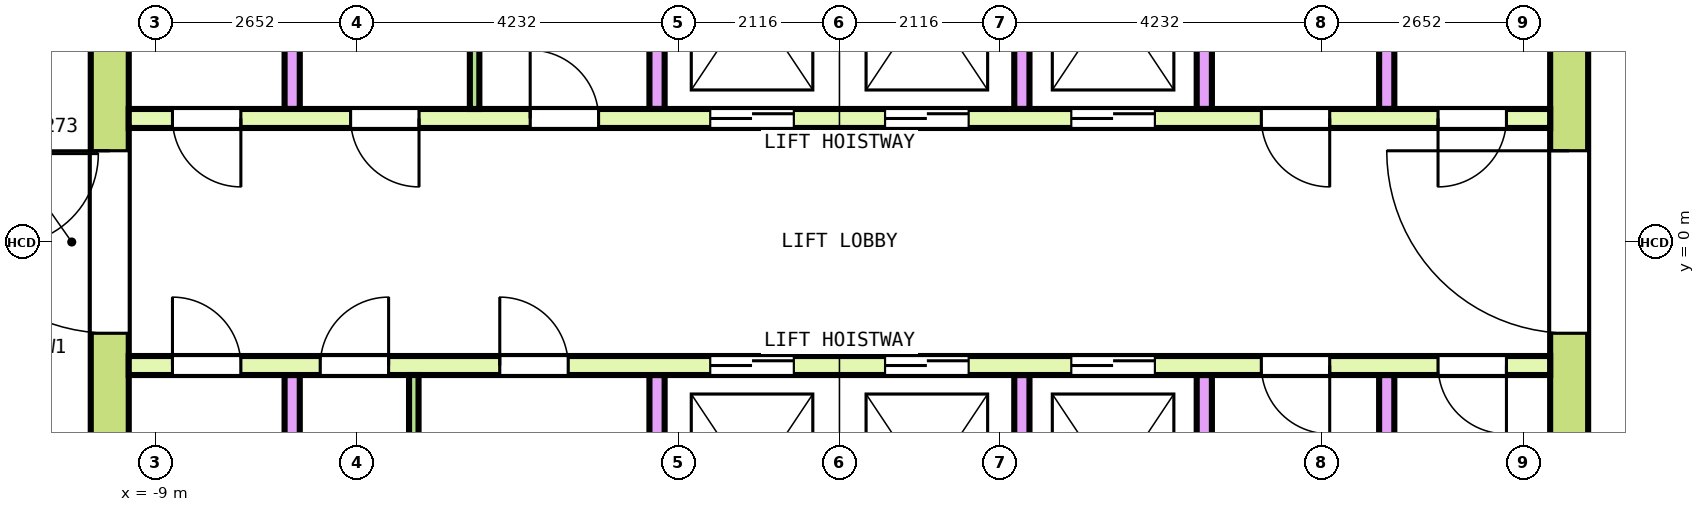
"""IFC4 building model, lengths in metres.
Left out: names, types, materials, properties, quantities, classifications, styles, units other than length and angle.
Written with IfcOpenShell. Run it as: python <this file> out.ifc"""

import sys

from ifc_helpers import new_model, si_unit, direction, frame, frame_2d, origin, place, context, subcontext, project, spatial, rectangle, extrude, element, fill, save


model = new_model("IFC4")
c1 = context("Model", 3, precision=1e-05, world=origin(), true_north=direction((0.0, 1.0)))
c2 = subcontext(c1, "Body", "Model", "MODEL_VIEW")
j1 = project(units=[si_unit("LENGTHUNIT", "METRE"), si_unit("PLANEANGLEUNIT", "RADIAN")], contexts=[c1])
p1 = place(None, origin())
s1 = spatial("IfcSite", under=j1, at=p1, CompositionType="ELEMENT")
p2 = place(p1, origin())
s2 = spatial("IfcBuilding", under=s1, at=p2, CompositionType="ELEMENT")
p3 = place(p2, frame((0.0, 0.0, 299.0)))
s3 = spatial("IfcBuildingStorey", under=s2, at=p3, CompositionType="ELEMENT", Elevation=299.0)
p4 = place(p3, frame((-9.6, -7.85, 0.0), z_axis=(0.0, 0.0, 1.0), x_axis=(0.0, 1.0, 0.0)))
e1 = element("IfcWall", 1, at=p4, inside=s3, PredefinedType="SHEAR", context=c2, shape_type="SweptSolid", body=[
    extrude(rectangle(XDim=15.7, YDim=0.5, at=frame_2d((7.85, 0.0))), origin(), (0.0, 0.0, 1.0), 3.7),
])
p5 = place(p4, frame((6.65, 0.0, 0.0)))
e2 = element("IfcOpeningElement", 2, at=p5, cuts=e1, PredefinedType="OPENING", context=c2, shape_type="SweptSolid", body=[
    extrude(rectangle(XDim=2.4, YDim=2.1, at=frame_2d((1.2, 1.05))), frame((0.0, 0.26, 0.0), z_axis=(0.0, -1.0, 0.0), x_axis=(1.0, 0.0, 0.0)), (0.0, 0.0, 1.0), 0.52),
])
p6 = place(p4, frame((13.55, 0.0, 0.0)))
e3 = element("IfcOpeningElement", 3, at=p6, cuts=e1, PredefinedType="OPENING", context=c2, shape_type="SweptSolid", body=[
    extrude(rectangle(XDim=1.2, YDim=2.1, at=frame_2d((0.6, 1.05))), frame((0.0, 0.26, 0.0), z_axis=(0.0, -1.0, 0.0), x_axis=(1.0, 0.0, 0.0)), (0.0, 0.0, 1.0), 0.52),
])
p7 = place(p4, frame((0.95, 0.0, 0.0)))
e4 = element("IfcOpeningElement", 4, at=p7, cuts=e1, PredefinedType="OPENING", context=c2, shape_type="SweptSolid", body=[
    extrude(rectangle(XDim=1.2, YDim=2.1, at=frame_2d((0.6, 1.05))), frame((0.0, 0.26, 0.0), z_axis=(0.0, -1.0, 0.0), x_axis=(1.0, 0.0, 0.0)), (0.0, 0.0, 1.0), 0.52),
])
p8 = place(p3, frame((9.6, -7.85, 0.0), z_axis=(0.0, 0.0, 1.0), x_axis=(0.0, 1.0, 0.0)))
e5 = element("IfcWall", 5, at=p8, inside=s3, PredefinedType="SHEAR", context=c2, shape_type="SweptSolid", body=[
    extrude(rectangle(XDim=15.7, YDim=0.5, at=frame_2d((7.85, 0.0))), origin(), (0.0, 0.0, 1.0), 3.7),
])
p9 = place(p8, frame((6.65, 0.0, 0.0)))
e6 = element("IfcOpeningElement", 6, at=p9, cuts=e5, PredefinedType="OPENING", context=c2, shape_type="SweptSolid", body=[
    extrude(rectangle(XDim=2.4, YDim=2.1, at=frame_2d((1.2, 1.05))), frame((0.0, 0.26, 0.0), z_axis=(0.0, -1.0, 0.0), x_axis=(1.0, 0.0, 0.0)), (0.0, 0.0, 1.0), 0.52),
])
p10 = place(p8, frame((13.55, 0.0, 0.0)))
e7 = element("IfcOpeningElement", 7, at=p10, cuts=e5, PredefinedType="OPENING", context=c2, shape_type="SweptSolid", body=[
    extrude(rectangle(XDim=1.2, YDim=2.1, at=frame_2d((0.6, 1.05))), frame((0.0, 0.26, 0.0), z_axis=(0.0, -1.0, 0.0), x_axis=(1.0, 0.0, 0.0)), (0.0, 0.0, 1.0), 0.52),
])
p11 = place(p8, frame((1.05, 0.0, 0.0)))
e8 = element("IfcOpeningElement", 8, at=p11, cuts=e5, PredefinedType="OPENING", context=c2, shape_type="SweptSolid", body=[
    extrude(rectangle(XDim=1.0, YDim=2.1, at=frame_2d((0.5, 1.05))), frame((0.0, 0.26, 0.0), z_axis=(0.0, -1.0, 0.0), x_axis=(1.0, 0.0, 0.0)), (0.0, 0.0, 1.0), 0.52),
])
p12 = place(p3, frame((-9.35, 1.625, 0.0), z_axis=(0.0, 0.0, 1.0), x_axis=(1.0, 0.0, 0.0)))
e9 = element("IfcWall", 9, at=p12, inside=s3, PredefinedType="SOLIDWALL", context=c2, shape_type="SweptSolid", body=[
    extrude(rectangle(XDim=18.7, YDim=0.25, at=frame_2d((9.35, 0.0))), origin(), (0.0, 0.0, 1.0), 3.7),
])
p13 = place(p12, frame((7.65, 0.0, 0.0)))
e10 = element("IfcOpeningElement", 10, at=p13, cuts=e9, PredefinedType="OPENING", context=c2, shape_type="SweptSolid", body=[
    extrude(rectangle(XDim=1.1, YDim=2.1, at=frame_2d((0.55, 1.05))), frame((0.0, 0.135, 0.0), z_axis=(0.0, -1.0, 0.0), x_axis=(1.0, 0.0, 0.0)), (0.0, 0.0, 1.0), 0.27),
])
p14 = place(p12, frame((9.95, 0.0, 0.0)))
e11 = element("IfcOpeningElement", 11, at=p14, cuts=e9, PredefinedType="OPENING", context=c2, shape_type="SweptSolid", body=[
    extrude(rectangle(XDim=1.1, YDim=2.1, at=frame_2d((0.55, 1.05))), frame((0.0, 0.135, 0.0), z_axis=(0.0, -1.0, 0.0), x_axis=(1.0, 0.0, 0.0)), (0.0, 0.0, 1.0), 0.27),
])
p15 = place(p12, frame((12.4, 0.0, 0.0)))
e12 = element("IfcOpeningElement", 12, at=p15, cuts=e9, PredefinedType="OPENING", context=c2, shape_type="SweptSolid", body=[
    extrude(rectangle(XDim=1.1, YDim=2.1, at=frame_2d((0.55, 1.05))), frame((0.0, 0.135, 0.0), z_axis=(0.0, -1.0, 0.0), x_axis=(1.0, 0.0, 0.0)), (0.0, 0.0, 1.0), 0.27),
])
p16 = place(p12, frame((0.575, 0.0, 0.0)))
e13 = element("IfcOpeningElement", 13, at=p16, cuts=e9, PredefinedType="OPENING", context=c2, shape_type="SweptSolid", body=[
    extrude(rectangle(XDim=0.9, YDim=2.1, at=frame_2d((0.45, 1.05))), frame((0.0, 0.135, 0.0), z_axis=(0.0, -1.0, 0.0), x_axis=(1.0, 0.0, 0.0)), (0.0, 0.0, 1.0), 0.27),
])
p17 = place(p12, frame((2.919, 0.0, 0.0)))
e14 = element("IfcOpeningElement", 14, at=p17, cuts=e9, PredefinedType="OPENING", context=c2, shape_type="SweptSolid", body=[
    extrude(rectangle(XDim=0.9, YDim=2.1, at=frame_2d((0.45, 1.05))), frame((0.0, 0.135, 0.0), z_axis=(0.0, -1.0, 0.0), x_axis=(1.0, 0.0, 0.0)), (0.0, 0.0, 1.0), 0.27),
])
p18 = place(p12, frame((5.281, 0.0, 0.0)))
e15 = element("IfcOpeningElement", 15, at=p18, cuts=e9, PredefinedType="OPENING", context=c2, shape_type="SweptSolid", body=[
    extrude(rectangle(XDim=0.9, YDim=2.1, at=frame_2d((0.45, 1.05))), frame((0.0, 0.135, 0.0), z_axis=(0.0, -1.0, 0.0), x_axis=(1.0, 0.0, 0.0)), (0.0, 0.0, 1.0), 0.27),
])
p19 = place(p12, frame((14.9, 0.0, 0.0)))
e16 = element("IfcOpeningElement", 16, at=p19, cuts=e9, PredefinedType="OPENING", context=c2, shape_type="SweptSolid", body=[
    extrude(rectangle(XDim=0.9, YDim=2.1, at=frame_2d((0.45, 1.05))), frame((0.0, 0.135, 0.0), z_axis=(0.0, -1.0, 0.0), x_axis=(1.0, 0.0, 0.0)), (0.0, 0.0, 1.0), 0.27),
])
p20 = place(p12, frame((17.225, 0.0, 0.0)))
e17 = element("IfcOpeningElement", 17, at=p20, cuts=e9, PredefinedType="OPENING", context=c2, shape_type="SweptSolid", body=[
    extrude(rectangle(XDim=0.9, YDim=2.1, at=frame_2d((0.45, 1.05))), frame((0.0, 0.135, 0.0), z_axis=(0.0, -1.0, 0.0), x_axis=(1.0, 0.0, 0.0)), (0.0, 0.0, 1.0), 0.27),
])
for number, where, z_axis, x_axis in (
    (18, (-7.2, 1.75, 0.0), (0.0, 0.0, 1.0), (0.0, 1.0, 0.0)),
    (19, (-2.4, 1.75, 0.0), (0.0, 0.0, 1.0), (0.0, 1.0, 0.0)),
    (20, (2.4, 1.75, 0.0), (0.0, 0.0, 1.0), (0.0, 1.0, 0.0)),
    (21, (4.8, 1.75, 0.0), (0.0, 0.0, 1.0), (0.0, 1.0, 0.0)),
    (22, (7.2, 1.75, 0.0), (0.0, 0.0, 1.0), (0.0, 1.0, 0.0)),
):
    element("IfcWall", number, at=place(p3, frame(where, z_axis=z_axis, x_axis=x_axis)), inside=s3, PredefinedType="SOLIDWALL", context=c2, shape_type="SweptSolid", body=[
        extrude(rectangle(XDim=2.9, YDim=0.2, at=frame_2d((1.45, 0.0))), origin(), (0.0, 0.0, 1.0), 3.7),
    ])
p21 = place(p3, frame((-9.35, -1.625, 0.0), z_axis=(0.0, 0.0, 1.0), x_axis=(1.0, 0.0, 0.0)))
e23 = element("IfcWall", 23, at=p21, inside=s3, PredefinedType="SOLIDWALL", context=c2, shape_type="SweptSolid", body=[
    extrude(rectangle(XDim=18.7, YDim=0.25, at=frame_2d((9.35, 0.0))), origin(), (0.0, 0.0, 1.0), 3.7),
])
p22 = place(p21, frame((7.65, 0.0, 0.0)))
e24 = element("IfcOpeningElement", 24, at=p22, cuts=e23, PredefinedType="OPENING", context=c2, shape_type="SweptSolid", body=[
    extrude(rectangle(XDim=1.1, YDim=2.1, at=frame_2d((0.55, 1.05))), frame((0.0, 0.135, 0.0), z_axis=(0.0, -1.0, 0.0), x_axis=(1.0, 0.0, 0.0)), (0.0, 0.0, 1.0), 0.27),
])
p23 = place(p21, frame((9.95, 0.0, 0.0)))
e25 = element("IfcOpeningElement", 25, at=p23, cuts=e23, PredefinedType="OPENING", context=c2, shape_type="SweptSolid", body=[
    extrude(rectangle(XDim=1.1, YDim=2.1, at=frame_2d((0.55, 1.05))), frame((0.0, 0.135, 0.0), z_axis=(0.0, -1.0, 0.0), x_axis=(1.0, 0.0, 0.0)), (0.0, 0.0, 1.0), 0.27),
])
p24 = place(p21, frame((12.4, 0.0, 0.0)))
e26 = element("IfcOpeningElement", 26, at=p24, cuts=e23, PredefinedType="OPENING", context=c2, shape_type="SweptSolid", body=[
    extrude(rectangle(XDim=1.1, YDim=2.1, at=frame_2d((0.55, 1.05))), frame((0.0, 0.135, 0.0), z_axis=(0.0, -1.0, 0.0), x_axis=(1.0, 0.0, 0.0)), (0.0, 0.0, 1.0), 0.27),
])
p25 = place(p21, frame((0.575, 0.0, 0.0)))
e27 = element("IfcOpeningElement", 27, at=p25, cuts=e23, PredefinedType="OPENING", context=c2, shape_type="SweptSolid", body=[
    extrude(rectangle(XDim=0.9, YDim=2.1, at=frame_2d((0.45, 1.05))), frame((0.0, 0.135, 0.0), z_axis=(0.0, -1.0, 0.0), x_axis=(1.0, 0.0, 0.0)), (0.0, 0.0, 1.0), 0.27),
])
p26 = place(p21, frame((2.519, 0.0, 0.0)))
e28 = element("IfcOpeningElement", 28, at=p26, cuts=e23, PredefinedType="OPENING", context=c2, shape_type="SweptSolid", body=[
    extrude(rectangle(XDim=0.9, YDim=2.1, at=frame_2d((0.45, 1.05))), frame((0.0, 0.135, 0.0), z_axis=(0.0, -1.0, 0.0), x_axis=(1.0, 0.0, 0.0)), (0.0, 0.0, 1.0), 0.27),
])
p27 = place(p21, frame((4.881, 0.0, 0.0)))
e29 = element("IfcOpeningElement", 29, at=p27, cuts=e23, PredefinedType="OPENING", context=c2, shape_type="SweptSolid", body=[
    extrude(rectangle(XDim=0.9, YDim=2.1, at=frame_2d((0.45, 1.05))), frame((0.0, 0.135, 0.0), z_axis=(0.0, -1.0, 0.0), x_axis=(1.0, 0.0, 0.0)), (0.0, 0.0, 1.0), 0.27),
])
p28 = place(p21, frame((14.9, 0.0, 0.0)))
e30 = element("IfcOpeningElement", 30, at=p28, cuts=e23, PredefinedType="OPENING", context=c2, shape_type="SweptSolid", body=[
    extrude(rectangle(XDim=0.9, YDim=2.1, at=frame_2d((0.45, 1.05))), frame((0.0, 0.135, 0.0), z_axis=(0.0, -1.0, 0.0), x_axis=(1.0, 0.0, 0.0)), (0.0, 0.0, 1.0), 0.27),
])
p29 = place(p21, frame((17.225, 0.0, 0.0)))
e31 = element("IfcOpeningElement", 31, at=p29, cuts=e23, PredefinedType="OPENING", context=c2, shape_type="SweptSolid", body=[
    extrude(rectangle(XDim=0.9, YDim=2.1, at=frame_2d((0.45, 1.05))), frame((0.0, 0.135, 0.0), z_axis=(0.0, -1.0, 0.0), x_axis=(1.0, 0.0, 0.0)), (0.0, 0.0, 1.0), 0.27),
])
for number, where, z_axis, x_axis in (
    (32, (-7.2, -4.65, 0.0), (0.0, 0.0, 1.0), (0.0, 1.0, 0.0)),
    (33, (-2.4, -4.65, 0.0), (0.0, 0.0, 1.0), (0.0, 1.0, 0.0)),
    (34, (2.4, -4.65, 0.0), (0.0, 0.0, 1.0), (0.0, 1.0, 0.0)),
    (35, (4.8, -4.65, 0.0), (0.0, 0.0, 1.0), (0.0, 1.0, 0.0)),
    (36, (7.2, -4.65, 0.0), (0.0, 0.0, 1.0), (0.0, 1.0, 0.0)),
):
    element("IfcWall", number, at=place(p3, frame(where, z_axis=z_axis, x_axis=x_axis)), inside=s3, PredefinedType="SOLIDWALL", context=c2, shape_type="SweptSolid", body=[
        extrude(rectangle(XDim=2.9, YDim=0.2, at=frame_2d((1.45, 0.0))), origin(), (0.0, 0.0, 1.0), 3.7),
    ])
for number, where, z_axis, x_axis in (
    (37, (-4.8, 1.75, 0.0), (0.0, 0.0, 1.0), (0.0, 1.0, 0.0)),
    (38, (-5.6, -4.65, 0.0), (0.0, 0.0, 1.0), (0.0, 1.0, 0.0)),
):
    element("IfcWall", number, at=place(p3, frame(where, z_axis=z_axis, x_axis=x_axis)), inside=s3, PredefinedType="PARTITIONING", context=c2, shape_type="SweptSolid", body=[
        extrude(rectangle(XDim=2.9, YDim=0.125, at=frame_2d((1.45, 0.0))), origin(), (0.0, 0.0, 1.0), 3.7),
    ])
p30 = place(p13, origin())
e39 = element("IfcDoor", 39, at=p30, inside=s3, OperationType="DOUBLE_DOOR_SLIDING", PredefinedType="DOOR", context=c2, shape_type="SweptSolid", body=[
    extrude(rectangle(XDim=1.1, YDim=2.1, at=frame_2d((0.55, 1.05))), frame((0.0, 0.075, 0.0), z_axis=(0.0, -1.0, 0.0), x_axis=(1.0, 0.0, 0.0)), (0.0, 0.0, 1.0), 0.15),
])
fill(e10, e39)
p31 = place(p14, origin())
e40 = element("IfcDoor", 40, at=p31, inside=s3, OperationType="DOUBLE_DOOR_SLIDING", PredefinedType="DOOR", context=c2, shape_type="SweptSolid", body=[
    extrude(rectangle(XDim=1.1, YDim=2.1, at=frame_2d((0.55, 1.05))), frame((0.0, 0.075, 0.0), z_axis=(0.0, -1.0, 0.0), x_axis=(1.0, 0.0, 0.0)), (0.0, 0.0, 1.0), 0.15),
])
fill(e11, e40)
p32 = place(p15, origin())
e41 = element("IfcDoor", 41, at=p32, inside=s3, OperationType="DOUBLE_DOOR_SLIDING", PredefinedType="DOOR", context=c2, shape_type="SweptSolid", body=[
    extrude(rectangle(XDim=1.1, YDim=2.1, at=frame_2d((0.55, 1.05))), frame((0.0, 0.075, 0.0), z_axis=(0.0, -1.0, 0.0), x_axis=(1.0, 0.0, 0.0)), (0.0, 0.0, 1.0), 0.15),
])
fill(e12, e41)
p33 = place(p22, origin())
e42 = element("IfcDoor", 42, at=p33, inside=s3, OperationType="DOUBLE_DOOR_SLIDING", PredefinedType="DOOR", context=c2, shape_type="SweptSolid", body=[
    extrude(rectangle(XDim=1.1, YDim=2.1, at=frame_2d((0.55, 1.05))), frame((0.0, 0.075, 0.0), z_axis=(0.0, -1.0, 0.0), x_axis=(1.0, 0.0, 0.0)), (0.0, 0.0, 1.0), 0.15),
])
fill(e24, e42)
p34 = place(p23, origin())
e43 = element("IfcDoor", 43, at=p34, inside=s3, OperationType="DOUBLE_DOOR_SLIDING", PredefinedType="DOOR", context=c2, shape_type="SweptSolid", body=[
    extrude(rectangle(XDim=1.1, YDim=2.1, at=frame_2d((0.55, 1.05))), frame((0.0, 0.075, 0.0), z_axis=(0.0, -1.0, 0.0), x_axis=(1.0, 0.0, 0.0)), (0.0, 0.0, 1.0), 0.15),
])
fill(e25, e43)
p35 = place(p24, origin())
e44 = element("IfcDoor", 44, at=p35, inside=s3, OperationType="DOUBLE_DOOR_SLIDING", PredefinedType="DOOR", context=c2, shape_type="SweptSolid", body=[
    extrude(rectangle(XDim=1.1, YDim=2.1, at=frame_2d((0.55, 1.05))), frame((0.0, 0.075, 0.0), z_axis=(0.0, -1.0, 0.0), x_axis=(1.0, 0.0, 0.0)), (0.0, 0.0, 1.0), 0.15),
])
fill(e26, e44)
p36 = place(p5, origin())
e45 = element("IfcDoor", 45, at=p36, inside=s3, OperationType="DOUBLE_DOOR_SINGLE_SWING", PredefinedType="DOOR", context=c2, shape_type="SweptSolid", body=[
    extrude(rectangle(XDim=2.4, YDim=2.1, at=frame_2d((1.2, 1.05))), frame((0.0, 0.2, 0.0), z_axis=(0.0, -1.0, 0.0), x_axis=(1.0, 0.0, 0.0)), (0.0, 0.0, 1.0), 0.4),
])
fill(e2, e45)
p37 = place(p9, origin())
e46 = element("IfcDoor", 46, at=p37, inside=s3, OperationType="DOUBLE_DOOR_SINGLE_SWING", PredefinedType="DOOR", context=c2, shape_type="SweptSolid", body=[
    extrude(rectangle(XDim=2.4, YDim=2.1, at=frame_2d((1.2, 1.05))), frame((0.0, 0.2, 0.0), z_axis=(0.0, -1.0, 0.0), x_axis=(1.0, 0.0, 0.0)), (0.0, 0.0, 1.0), 0.4),
])
fill(e6, e46)
p38 = place(p16, origin())
e47 = element("IfcDoor", 47, at=p38, inside=s3, OperationType="SINGLE_SWING_LEFT", PredefinedType="DOOR", context=c2, shape_type="SweptSolid", body=[
    extrude(rectangle(XDim=0.9, YDim=2.1, at=frame_2d((0.45, 1.05))), frame((0.0, 0.075, 0.0), z_axis=(0.0, -1.0, 0.0), x_axis=(1.0, 0.0, 0.0)), (0.0, 0.0, 1.0), 0.15),
])
fill(e13, e47)
p39 = place(p17, origin())
e48 = element("IfcDoor", 48, at=p39, inside=s3, OperationType="SINGLE_SWING_RIGHT", PredefinedType="DOOR", context=c2, shape_type="SweptSolid", body=[
    extrude(rectangle(XDim=0.9, YDim=2.1, at=frame_2d((0.45, 1.05))), frame((0.0, 0.075, 0.0), z_axis=(0.0, -1.0, 0.0), x_axis=(1.0, 0.0, 0.0)), (0.0, 0.0, 1.0), 0.15),
])
fill(e14, e48)
p40 = place(p18, origin())
e49 = element("IfcDoor", 49, at=p40, inside=s3, OperationType="SINGLE_SWING_LEFT", PredefinedType="DOOR", context=c2, shape_type="SweptSolid", body=[
    extrude(rectangle(XDim=0.9, YDim=2.1, at=frame_2d((0.45, 1.05))), frame((0.0, 0.075, 0.0), z_axis=(0.0, -1.0, 0.0), x_axis=(1.0, 0.0, 0.0)), (0.0, 0.0, 1.0), 0.15),
])
fill(e15, e49)
p41 = place(p19, origin())
e50 = element("IfcDoor", 50, at=p41, inside=s3, OperationType="SINGLE_SWING_RIGHT", PredefinedType="DOOR", context=c2, shape_type="SweptSolid", body=[
    extrude(rectangle(XDim=0.9, YDim=2.1, at=frame_2d((0.45, 1.05))), frame((0.0, 0.075, 0.0), z_axis=(0.0, -1.0, 0.0), x_axis=(1.0, 0.0, 0.0)), (0.0, 0.0, 1.0), 0.15),
])
fill(e16, e50)
p42 = place(p20, origin())
e51 = element("IfcDoor", 51, at=p42, inside=s3, OperationType="SINGLE_SWING_LEFT", PredefinedType="DOOR", context=c2, shape_type="SweptSolid", body=[
    extrude(rectangle(XDim=0.9, YDim=2.1, at=frame_2d((0.45, 1.05))), frame((0.0, 0.075, 0.0), z_axis=(0.0, -1.0, 0.0), x_axis=(1.0, 0.0, 0.0)), (0.0, 0.0, 1.0), 0.15),
])
fill(e17, e51)
p43 = place(p25, origin())
e52 = element("IfcDoor", 52, at=p43, inside=s3, OperationType="SINGLE_SWING_RIGHT", PredefinedType="DOOR", context=c2, shape_type="SweptSolid", body=[
    extrude(rectangle(XDim=0.9, YDim=2.1, at=frame_2d((0.45, 1.05))), frame((0.0, 0.075, 0.0), z_axis=(0.0, -1.0, 0.0), x_axis=(1.0, 0.0, 0.0)), (0.0, 0.0, 1.0), 0.15),
])
fill(e27, e52)
p44 = place(p26, origin())
e53 = element("IfcDoor", 53, at=p44, inside=s3, OperationType="SINGLE_SWING_LEFT", PredefinedType="DOOR", context=c2, shape_type="SweptSolid", body=[
    extrude(rectangle(XDim=0.9, YDim=2.1, at=frame_2d((0.45, 1.05))), frame((0.0, 0.075, 0.0), z_axis=(0.0, -1.0, 0.0), x_axis=(1.0, 0.0, 0.0)), (0.0, 0.0, 1.0), 0.15),
])
fill(e28, e53)
p45 = place(p27, origin())
e54 = element("IfcDoor", 54, at=p45, inside=s3, OperationType="SINGLE_SWING_RIGHT", PredefinedType="DOOR", context=c2, shape_type="SweptSolid", body=[
    extrude(rectangle(XDim=0.9, YDim=2.1, at=frame_2d((0.45, 1.05))), frame((0.0, 0.075, 0.0), z_axis=(0.0, -1.0, 0.0), x_axis=(1.0, 0.0, 0.0)), (0.0, 0.0, 1.0), 0.15),
])
fill(e29, e54)
p46 = place(p28, origin())
e55 = element("IfcDoor", 55, at=p46, inside=s3, OperationType="SINGLE_SWING_LEFT", PredefinedType="DOOR", context=c2, shape_type="SweptSolid", body=[
    extrude(rectangle(XDim=0.9, YDim=2.1, at=frame_2d((0.45, 1.05))), frame((0.0, 0.075, 0.0), z_axis=(0.0, -1.0, 0.0), x_axis=(1.0, 0.0, 0.0)), (0.0, 0.0, 1.0), 0.15),
])
fill(e30, e55)
p47 = place(p29, origin())
e56 = element("IfcDoor", 56, at=p47, inside=s3, OperationType="SINGLE_SWING_RIGHT", PredefinedType="DOOR", context=c2, shape_type="SweptSolid", body=[
    extrude(rectangle(XDim=0.9, YDim=2.1, at=frame_2d((0.45, 1.05))), frame((0.0, 0.075, 0.0), z_axis=(0.0, -1.0, 0.0), x_axis=(1.0, 0.0, 0.0)), (0.0, 0.0, 1.0), 0.15),
])
fill(e31, e56)
save(model, sys.argv[1])
